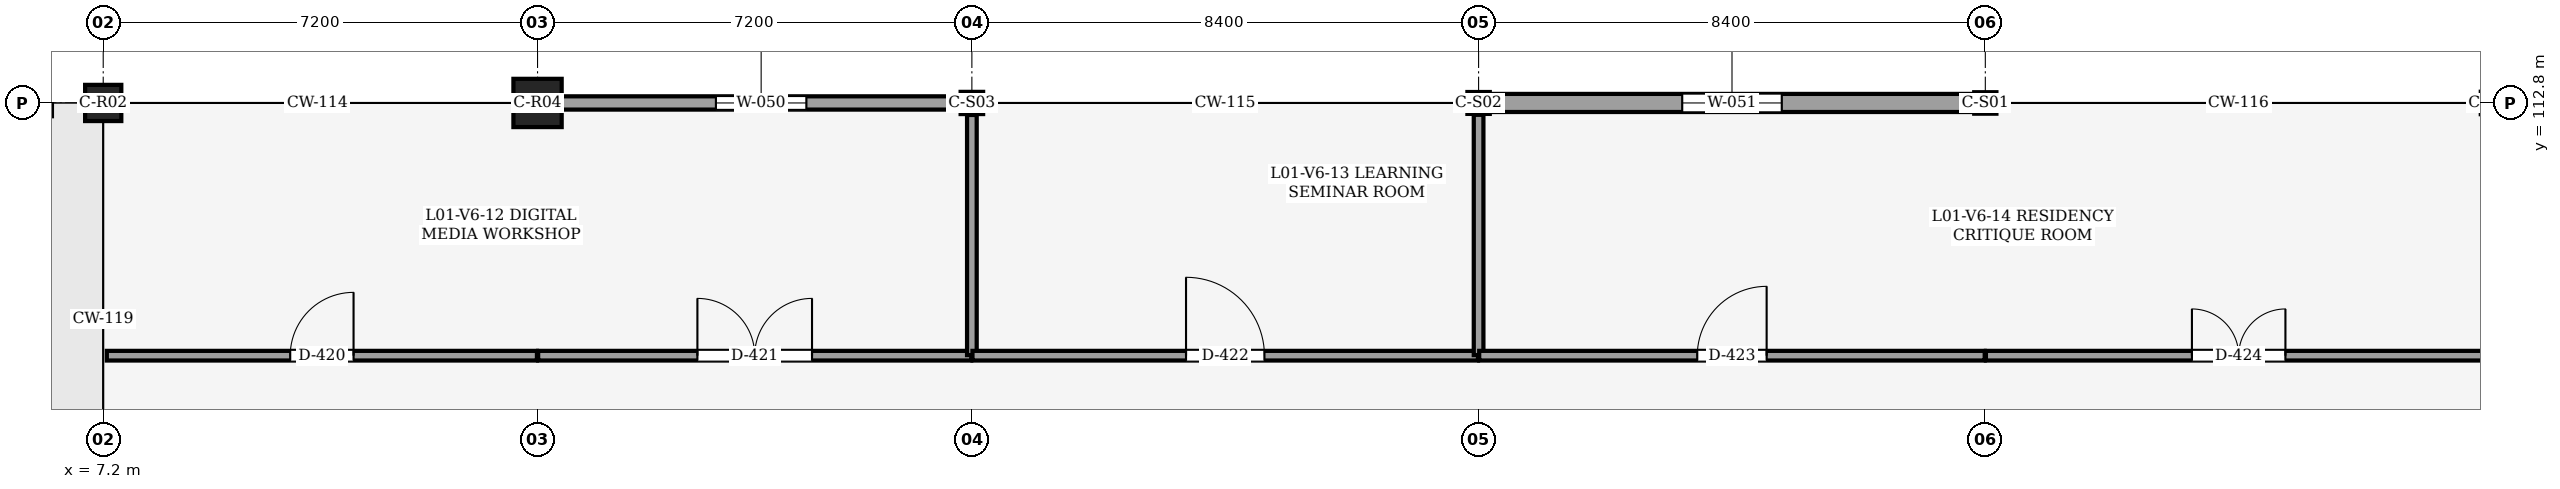
"""IFC4 building model, lengths in metres.
Left out: names, types, materials, properties, quantities, classifications, styles, units other than length and angle.
Written with IfcOpenShell. Run it as: python <this file> out.ifc"""

import sys

from ifc_helpers import new_model, si_unit, direction, frame, frame_2d, origin, origin_2d, place, context, subcontext, project, spatial, rectangle, i_section, extrude, element, fill, save


model = new_model("IFC4")
c1 = context("Model", 3, precision=1e-05, world=origin(), true_north=direction((0.0, 1.0)))
c2 = subcontext(c1, "Body", "Model", "MODEL_VIEW")
j1 = project(units=[si_unit("LENGTHUNIT", "METRE"), si_unit("PLANEANGLEUNIT", "RADIAN")], contexts=[c1])
p1 = place(None, origin())
s1 = spatial("IfcSite", under=j1, at=p1, CompositionType="ELEMENT")
p2 = place(p1, origin())
s2 = spatial("IfcBuilding", under=s1, at=p2, CompositionType="ELEMENT")
p3 = place(p2, frame((0.0, 0.0, 5.4)))
s3 = spatial("IfcBuildingStorey", under=s2, at=p3, CompositionType="ELEMENT", Elevation=5.4)
p4 = place(p3, frame((7.2, 112.8, 0.0), z_axis=(0.0, 0.0, 1.0), x_axis=(1.0, 0.0, 0.0)))
e1 = element("IfcColumn", 1, at=p4, inside=s3, PredefinedType="COLUMN", context=c2, shape_type="SweptSolid", body=[
    extrude(rectangle(XDim=0.6, YDim=0.6, at=origin_2d()), origin(), (0.0, 0.0, 1.0), 4.8),
])
p5 = place(p3, frame((14.4, 112.8, 0.0), z_axis=(0.0, 0.0, 1.0), x_axis=(1.0, 0.0, 0.0)))
e2 = element("IfcColumn", 2, at=p5, inside=s3, PredefinedType="COLUMN", context=c2, shape_type="SweptSolid", body=[
    extrude(rectangle(XDim=0.8, YDim=0.8, at=origin_2d()), origin(), (0.0, 0.0, 1.0), 4.8),
])
p6 = place(p3, frame((21.6, 112.8, 0.0), z_axis=(0.0, 0.0, 1.0), x_axis=(1.0, 0.0, 0.0)))
e3 = element("IfcColumn", 3, at=p6, inside=s3, PredefinedType="COLUMN", context=c2, shape_type="SweptSolid", body=[
    extrude(i_section(OverallWidth=0.373, OverallDepth=0.368, WebThickness=0.015, FlangeThickness=0.024, FilletRadius=0.025, at=origin_2d()), origin(), (0.0, 0.0, 1.0), 4.8),
])
p7 = place(p3, frame((30.0, 112.8, 0.0), z_axis=(0.0, 0.0, 1.0), x_axis=(1.0, 0.0, 0.0)))
e4 = element("IfcColumn", 4, at=p7, inside=s3, PredefinedType="COLUMN", context=c2, shape_type="SweptSolid", body=[
    extrude(i_section(OverallWidth=0.371, OverallDepth=0.363, WebThickness=0.013, FlangeThickness=0.022, FilletRadius=0.025, at=origin_2d()), origin(), (0.0, 0.0, 1.0), 4.8),
])
p8 = place(p3, frame((38.4, 112.8, 0.0), z_axis=(0.0, 0.0, 1.0), x_axis=(1.0, 0.0, 0.0)))
e5 = element("IfcColumn", 5, at=p8, inside=s3, PredefinedType="COLUMN", context=c2, shape_type="SweptSolid", body=[
    extrude(i_section(OverallWidth=0.368, OverallDepth=0.356, WebThickness=0.011, FlangeThickness=0.018, FilletRadius=0.025, at=origin_2d()), origin(), (0.0, 0.0, 1.0), 4.8),
])
p9 = place(p3, frame((14.8, 112.8, 0.0), z_axis=(0.0, 0.0, 1.0), x_axis=(1.0, 0.0, 0.0)))
e6 = element("IfcWall", 6, at=p9, inside=s3, PredefinedType="SOLIDWALL", context=c2, shape_type="SweptSolid", body=[
    extrude(rectangle(XDim=6.614, YDim=0.22, at=frame_2d((3.307, 0.0))), origin(), (0.0, 0.0, 1.0), 3.913),
])
p10 = place(p9, frame((2.557, 0.0, 0.9)))
e7 = element("IfcOpeningElement", 7, at=p10, cuts=e6, PredefinedType="OPENING", context=c2, shape_type="SweptSolid", body=[
    extrude(rectangle(XDim=1.5, YDim=1.5, at=frame_2d((0.75, 0.75))), frame((0.0, 0.12, 0.0), z_axis=(0.0, -1.0, 0.0), x_axis=(1.0, 0.0, 0.0)), (0.0, 0.0, 1.0), 0.24),
])
p11 = place(p3, frame((30.186, 112.8, 0.0), z_axis=(0.0, 0.0, 1.0), x_axis=(1.0, 0.0, 0.0)))
e8 = element("IfcWall", 8, at=p11, inside=s3, PredefinedType="SOLIDWALL", context=c2, shape_type="SweptSolid", body=[
    extrude(rectangle(XDim=8.031, YDim=0.3, at=frame_2d((4.015, 0.0))), origin(), (0.0, 0.0, 1.0), 3.908),
])
p12 = place(p11, frame((3.19, 0.0, 0.9)))
e9 = element("IfcOpeningElement", 9, at=p12, cuts=e8, PredefinedType="OPENING", context=c2, shape_type="SweptSolid", body=[
    extrude(rectangle(XDim=1.65, YDim=1.5, at=frame_2d((0.825, 0.75))), frame((0.0, 0.16, 0.0), z_axis=(0.0, -1.0, 0.0), x_axis=(1.0, 0.0, 0.0)), (0.0, 0.0, 1.0), 0.321),
])
p13 = place(p3, frame((7.26, 108.61, 0.0), z_axis=(0.0, 0.0, 1.0), x_axis=(1.0, 0.0, 0.0)))
e10 = element("IfcWall", 10, at=p13, inside=s3, PredefinedType="PARTITIONING", context=c2, shape_type="SweptSolid", body=[
    extrude(rectangle(XDim=7.13, YDim=0.16, at=frame_2d((3.565, 0.0))), origin(), (0.0, 0.0, 1.0), 4.52),
])
p14 = place(p13, frame((3.04, 0.0, 0.0)))
e11 = element("IfcOpeningElement", 11, at=p14, cuts=e10, PredefinedType="OPENING", context=c2, shape_type="SweptSolid", body=[
    extrude(rectangle(XDim=1.05, YDim=2.15, at=frame_2d((0.525, 1.075))), frame((0.0, 0.09, 0.0), z_axis=(0.0, -1.0, 0.0), x_axis=(1.0, 0.0, 0.0)), (0.0, 0.0, 1.0), 0.18),
])
p15 = place(p3, frame((14.41, 108.61, 0.0), z_axis=(0.0, 0.0, 1.0), x_axis=(1.0, 0.0, 0.0)))
e12 = element("IfcWall", 12, at=p15, inside=s3, PredefinedType="PARTITIONING", context=c2, shape_type="SweptSolid", body=[
    extrude(rectangle(XDim=7.18, YDim=0.16, at=frame_2d((3.59, 0.0))), origin(), (0.0, 0.0, 1.0), 4.52),
])
p16 = place(p15, frame((2.64, 0.0, 0.0)))
e13 = element("IfcOpeningElement", 13, at=p16, cuts=e12, PredefinedType="OPENING", context=c2, shape_type="SweptSolid", body=[
    extrude(rectangle(XDim=1.9, YDim=2.45, at=frame_2d((0.95, 1.225))), frame((0.0, 0.09, 0.0), z_axis=(0.0, -1.0, 0.0), x_axis=(1.0, 0.0, 0.0)), (0.0, 0.0, 1.0), 0.18),
])
p17 = place(p3, frame((21.6, 108.62, 0.0), z_axis=(0.0, 0.0, 1.0), x_axis=(0.0, 1.0, 0.0)))
e14 = element("IfcWall", 14, at=p17, inside=s3, PredefinedType="PARTITIONING", context=c2, shape_type="SweptSolid", body=[
    extrude(rectangle(XDim=3.981, YDim=0.16, at=frame_2d((1.99, 0.0))), origin(), (0.0, 0.0, 1.0), 3.908),
])
p18 = place(p3, frame((21.61, 108.61, 0.0), z_axis=(0.0, 0.0, 1.0), x_axis=(1.0, 0.0, 0.0)))
e15 = element("IfcWall", 15, at=p18, inside=s3, PredefinedType="PARTITIONING", context=c2, shape_type="SweptSolid", body=[
    extrude(rectangle(XDim=8.38, YDim=0.16, at=frame_2d((4.19, 0.0))), origin(), (0.0, 0.0, 1.0), 4.52),
])
p19 = place(p18, frame((3.54, 0.0, 0.0)))
e16 = element("IfcOpeningElement", 16, at=p19, cuts=e15, PredefinedType="OPENING", context=c2, shape_type="SweptSolid", body=[
    extrude(rectangle(XDim=1.3, YDim=2.2, at=frame_2d((0.65, 1.1))), frame((0.0, 0.09, 0.0), z_axis=(0.0, -1.0, 0.0), x_axis=(1.0, 0.0, 0.0)), (0.0, 0.0, 1.0), 0.18),
])
p20 = place(p3, frame((30.0, 108.62, 0.0), z_axis=(0.0, 0.0, 1.0), x_axis=(0.0, 1.0, 0.0)))
e17 = element("IfcWall", 17, at=p20, inside=s3, PredefinedType="PARTITIONING", context=c2, shape_type="SweptSolid", body=[
    extrude(rectangle(XDim=3.983, YDim=0.16, at=frame_2d((1.992, 0.0))), origin(), (0.0, 0.0, 1.0), 3.913),
])
p21 = place(p3, frame((30.01, 108.61, 0.0), z_axis=(0.0, 0.0, 1.0), x_axis=(1.0, 0.0, 0.0)))
e18 = element("IfcWall", 18, at=p21, inside=s3, PredefinedType="PARTITIONING", context=c2, shape_type="SweptSolid", body=[
    extrude(rectangle(XDim=8.38, YDim=0.16, at=frame_2d((4.19, 0.0))), origin(), (0.0, 0.0, 1.0), 4.52),
])
p22 = place(p21, frame((3.615, 0.0, 0.0)))
e19 = element("IfcOpeningElement", 19, at=p22, cuts=e18, PredefinedType="OPENING", context=c2, shape_type="SweptSolid", body=[
    extrude(rectangle(XDim=1.15, YDim=2.2, at=frame_2d((0.575, 1.1))), frame((0.0, 0.09, 0.0), z_axis=(0.0, -1.0, 0.0), x_axis=(1.0, 0.0, 0.0)), (0.0, 0.0, 1.0), 0.18),
])
p23 = place(p3, frame((38.41, 108.61, 0.0), z_axis=(0.0, 0.0, 1.0), x_axis=(1.0, 0.0, 0.0)))
e20 = element("IfcWall", 20, at=p23, inside=s3, PredefinedType="PARTITIONING", context=c2, shape_type="SweptSolid", body=[
    extrude(rectangle(XDim=8.38, YDim=0.16, at=frame_2d((4.19, 0.0))), origin(), (0.0, 0.0, 1.0), 4.52),
])
p24 = place(p23, frame((3.415, 0.0, 0.0)))
e21 = element("IfcOpeningElement", 21, at=p24, cuts=e20, PredefinedType="OPENING", context=c2, shape_type="SweptSolid", body=[
    extrude(rectangle(XDim=1.55, YDim=2.3, at=frame_2d((0.775, 1.15))), frame((0.0, 0.09, 0.0), z_axis=(0.0, -1.0, 0.0), x_axis=(1.0, 0.0, 0.0)), (0.0, 0.0, 1.0), 0.18),
])
p25 = place(p10, origin())
e22 = element("IfcWindow", 22, at=p25, inside=s3, PartitioningType="SINGLE_PANEL", PredefinedType="WINDOW", context=c2, shape_type="SweptSolid", body=[
    extrude(rectangle(XDim=1.5, YDim=1.5, at=frame_2d((0.75, 0.75))), frame((0.0, 0.03, 0.0), z_axis=(0.0, -1.0, 0.0), x_axis=(1.0, 0.0, 0.0)), (0.0, 0.0, 1.0), 0.06),
])
fill(e7, e22)
p26 = place(p12, origin())
e23 = element("IfcWindow", 23, at=p26, inside=s3, PartitioningType="SINGLE_PANEL", PredefinedType="WINDOW", context=c2, shape_type="SweptSolid", body=[
    extrude(rectangle(XDim=1.65, YDim=1.5, at=frame_2d((0.825, 0.75))), frame((0.0, 0.03, 0.0), z_axis=(0.0, -1.0, 0.0), x_axis=(1.0, 0.0, 0.0)), (0.0, 0.0, 1.0), 0.06),
])
fill(e9, e23)
p27 = place(p14, origin())
e24 = element("IfcDoor", 24, at=p27, inside=s3, OperationType="SINGLE_SWING_RIGHT", PredefinedType="DOOR", context=c2, shape_type="SweptSolid", body=[
    extrude(rectangle(XDim=1.05, YDim=2.15, at=frame_2d((0.525, 1.075))), frame((0.0, 0.025, 0.0), z_axis=(0.0, -1.0, 0.0), x_axis=(1.0, 0.0, 0.0)), (0.0, 0.0, 1.0), 0.05),
])
fill(e11, e24)
p28 = place(p16, origin())
e25 = element("IfcDoor", 25, at=p28, inside=s3, OperationType="DOUBLE_DOOR_SINGLE_SWING", PredefinedType="DOOR", context=c2, shape_type="SweptSolid", body=[
    extrude(rectangle(XDim=1.9, YDim=2.45, at=frame_2d((0.95, 1.225))), frame((0.0, 0.025, 0.0), z_axis=(0.0, -1.0, 0.0), x_axis=(1.0, 0.0, 0.0)), (0.0, 0.0, 1.0), 0.05),
])
fill(e13, e25)
p29 = place(p19, origin())
e26 = element("IfcDoor", 26, at=p29, inside=s3, OperationType="SINGLE_SWING_LEFT", PredefinedType="DOOR", context=c2, shape_type="SweptSolid", body=[
    extrude(rectangle(XDim=1.3, YDim=2.2, at=frame_2d((0.65, 1.1))), frame((0.0, 0.025, 0.0), z_axis=(0.0, -1.0, 0.0), x_axis=(1.0, 0.0, 0.0)), (0.0, 0.0, 1.0), 0.05),
])
fill(e16, e26)
p30 = place(p22, origin())
e27 = element("IfcDoor", 27, at=p30, inside=s3, OperationType="SINGLE_SWING_RIGHT", PredefinedType="DOOR", context=c2, shape_type="SweptSolid", body=[
    extrude(rectangle(XDim=1.15, YDim=2.2, at=frame_2d((0.575, 1.1))), frame((0.0, 0.025, 0.0), z_axis=(0.0, -1.0, 0.0), x_axis=(1.0, 0.0, 0.0)), (0.0, 0.0, 1.0), 0.05),
])
fill(e19, e27)
p31 = place(p24, origin())
e28 = element("IfcDoor", 28, at=p31, inside=s3, OperationType="DOUBLE_DOOR_SINGLE_SWING", PredefinedType="DOOR", context=c2, shape_type="SweptSolid", body=[
    extrude(rectangle(XDim=1.55, YDim=2.3, at=frame_2d((0.775, 1.15))), frame((0.0, 0.025, 0.0), z_axis=(0.0, -1.0, 0.0), x_axis=(1.0, 0.0, 0.0)), (0.0, 0.0, 1.0), 0.05),
])
fill(e21, e28)
save(model, sys.argv[1])
